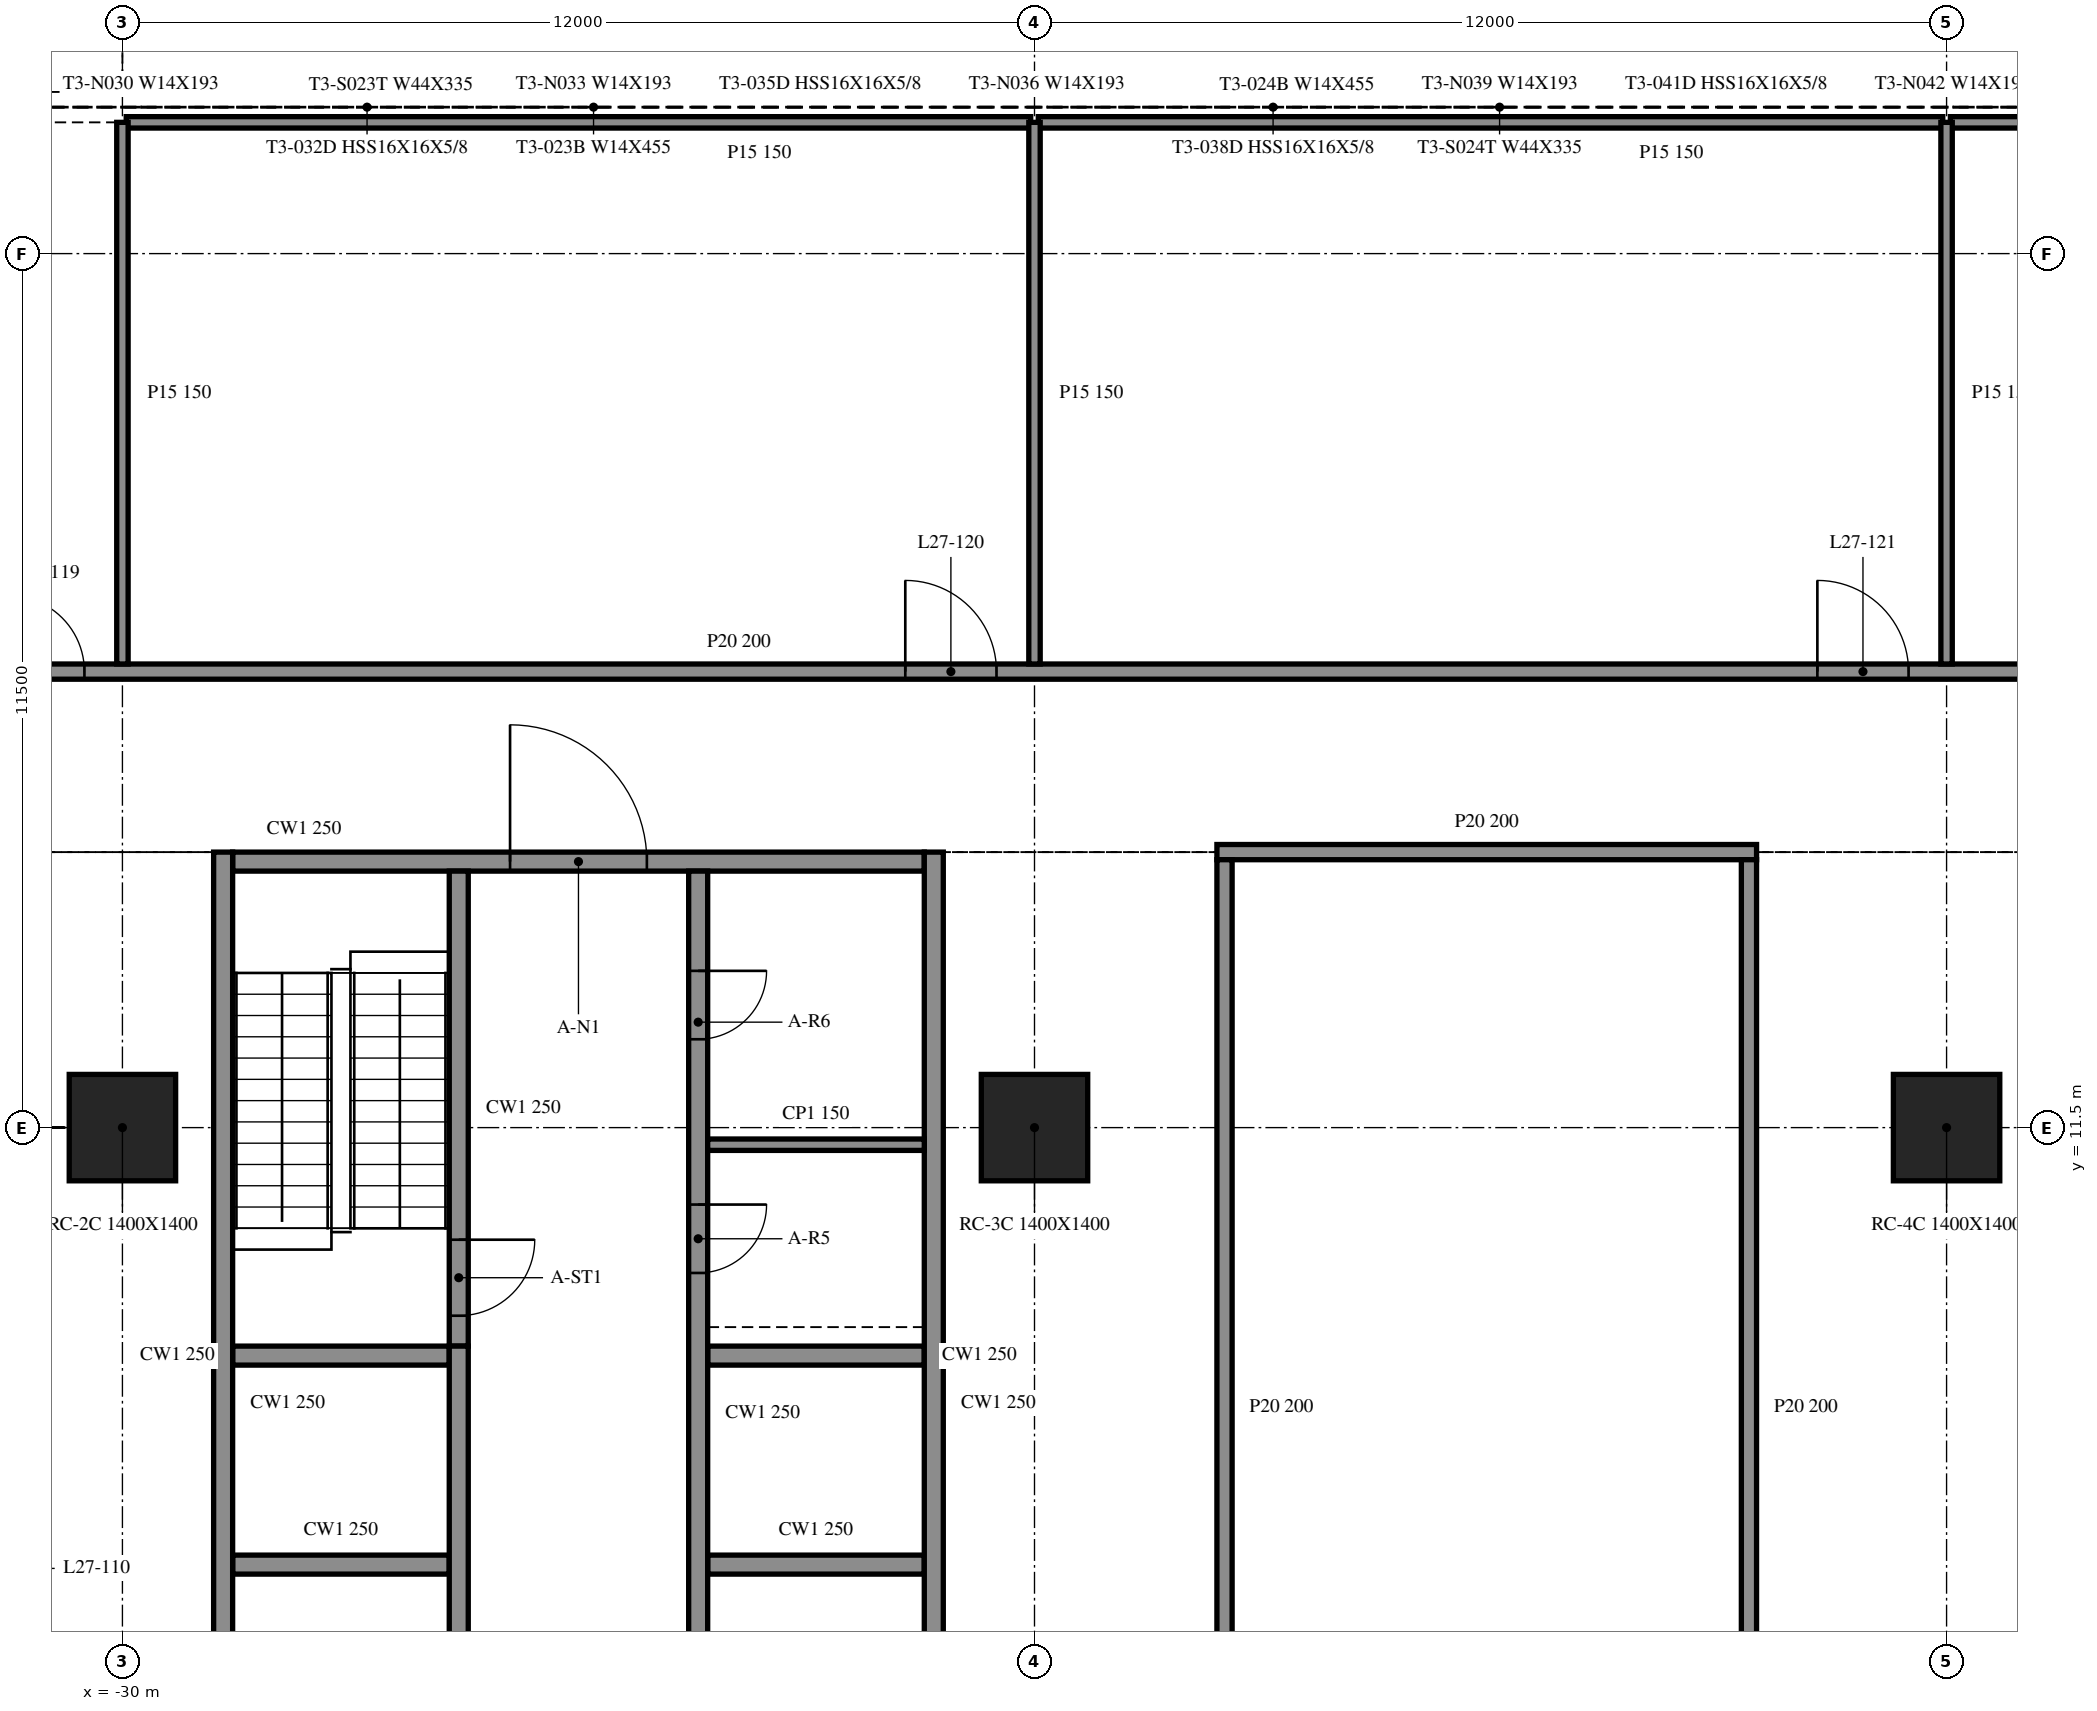
"""IFC4 building model, lengths in metres.
Left out: names, types, materials, properties, quantities, classifications, styles, units other than length and angle.
Written with IfcOpenShell. Run it as: python <this file> out.ifc"""

import sys

from ifc_helpers import new_model, si_unit, direction, frame, frame_2d, origin, origin_2d, place, context, subcontext, project, spatial, rectangle, extrude, element, fill, save


model = new_model("IFC4")
c1 = context("Model", 3, precision=1e-05, world=origin(), true_north=direction((0.0, 1.0)))
c2 = subcontext(c1, "Body", "Model", "MODEL_VIEW")
j1 = project(units=[si_unit("LENGTHUNIT", "METRE"), si_unit("PLANEANGLEUNIT", "RADIAN")], contexts=[c1])
p1 = place(None, origin())
s1 = spatial("IfcSite", under=j1, at=p1, CompositionType="ELEMENT")
p2 = place(p1, origin())
s2 = spatial("IfcBuilding", under=s1, at=p2, CompositionType="ELEMENT")
p3 = place(p2, frame((0.0, 0.0, 117.6)))
s3 = spatial("IfcBuildingStorey", under=s2, at=p3, CompositionType="ELEMENT", Elevation=117.6)
for number, where, z_axis, x_axis in (
    (1, (-30.0, 11.5, -0.55), (0.0, 0.0, 1.0), (1.0, 0.0, 0.0)),
    (2, (-18.0, 11.5, -0.55), (0.0, 0.0, 1.0), (1.0, 0.0, 0.0)),
    (3, (-6.0, 11.5, -0.55), (0.0, 0.0, 1.0), (1.0, 0.0, 0.0)),
):
    element("IfcColumn", number, at=place(p3, frame(where, z_axis=z_axis, x_axis=x_axis)), inside=s3, PredefinedType="COLUMN", context=c2, shape_type="SweptSolid", body=[
        extrude(rectangle(XDim=1.4, YDim=1.4, at=origin_2d()), origin(), (0.0, 0.0, 1.0), 4.61),
    ])
for number, where, z_axis, x_axis in (
    (4, (-28.675, 15.125, 0.0), (0.0, 0.0, 1.0), (0.0, -1.0, 0.0)),
    (5, (-19.325, -9.125, 0.0), (0.0, 0.0, 1.0), (0.0, 1.0, 0.0)),
):
    element("IfcWall", number, at=place(p3, frame(where, z_axis=z_axis, x_axis=x_axis)), inside=s3, PredefinedType="SOLIDWALL", context=c2, shape_type="SweptSolid", body=[
        extrude(rectangle(XDim=24.25, YDim=0.25, at=frame_2d((12.125, 0.0))), origin(), (0.0, 0.0, 1.0), 4.06),
    ])
p4 = place(p3, frame((-28.55, 15.0, 0.0), z_axis=(0.0, 0.0, 1.0), x_axis=(1.0, 0.0, 0.0)))
e6 = element("IfcWall", 6, at=p4, inside=s3, PredefinedType="SOLIDWALL", context=c2, shape_type="SweptSolid", body=[
    extrude(rectangle(XDim=9.1, YDim=0.25, at=frame_2d((4.55, 0.0))), origin(), (0.0, 0.0, 1.0), 4.06),
])
p5 = place(p4, frame((3.65, 0.0, 0.0)))
e7 = element("IfcOpeningElement", 7, at=p5, cuts=e6, PredefinedType="OPENING", context=c2, shape_type="SweptSolid", body=[
    extrude(rectangle(XDim=1.8, YDim=2.1, at=frame_2d((0.9, 1.05))), frame((0.0, 0.135, 0.0), z_axis=(0.0, -1.0, 0.0), x_axis=(1.0, 0.0, 0.0)), (0.0, 0.0, 1.0), 0.27),
])
p6 = place(p3, frame((-25.575, -8.875, 0.0), z_axis=(0.0, 0.0, 1.0), x_axis=(0.0, 1.0, 0.0)))
e8 = element("IfcWall", 8, at=p6, inside=s3, PredefinedType="SOLIDWALL", context=c2, shape_type="SweptSolid", body=[
    extrude(rectangle(XDim=17.5, YDim=0.25, at=frame_2d((8.75, 0.0))), origin(), (0.0, 0.0, 1.0), 4.06),
])
p7 = place(p6, frame((1.012, 0.0, 0.0)))
e9 = element("IfcOpeningElement", 9, at=p7, cuts=e8, PredefinedType="OPENING", context=c2, shape_type="SweptSolid", body=[
    extrude(rectangle(XDim=0.9, YDim=2.1, at=frame_2d((0.45, 1.05))), frame((0.0, 0.135, 0.0), z_axis=(0.0, -1.0, 0.0), x_axis=(1.0, 0.0, 0.0)), (0.0, 0.0, 1.0), 0.27),
])
p8 = place(p6, frame((4.087, 0.0, 0.0)))
e10 = element("IfcOpeningElement", 10, at=p8, cuts=e8, PredefinedType="OPENING", context=c2, shape_type="SweptSolid", body=[
    extrude(rectangle(XDim=0.9, YDim=2.1, at=frame_2d((0.45, 1.05))), frame((0.0, 0.135, 0.0), z_axis=(0.0, -1.0, 0.0), x_axis=(1.0, 0.0, 0.0)), (0.0, 0.0, 1.0), 0.27),
])
p9 = place(p3, frame((-25.575, 14.875, 0.0), z_axis=(0.0, 0.0, 1.0), x_axis=(0.0, -1.0, 0.0)))
e11 = element("IfcWall", 11, at=p9, inside=s3, PredefinedType="SOLIDWALL", context=c2, shape_type="SweptSolid", body=[
    extrude(rectangle(XDim=6.25, YDim=0.25, at=frame_2d((3.125, 0.0))), origin(), (0.0, 0.0, 1.0), 4.06),
])
p10 = place(p9, frame((4.85, 0.0, 0.0)))
e12 = element("IfcOpeningElement", 12, at=p10, cuts=e11, PredefinedType="OPENING", context=c2, shape_type="SweptSolid", body=[
    extrude(rectangle(XDim=1.0, YDim=2.1, at=frame_2d((0.5, 1.05))), frame((0.0, 0.135, 0.0), z_axis=(0.0, -1.0, 0.0), x_axis=(1.0, 0.0, 0.0)), (0.0, 0.0, 1.0), 0.27),
])
p11 = place(p3, frame((-22.425, 14.875, 0.0), z_axis=(0.0, 0.0, 1.0), x_axis=(0.0, -1.0, 0.0)))
e13 = element("IfcWall", 13, at=p11, inside=s3, PredefinedType="SOLIDWALL", context=c2, shape_type="SweptSolid", body=[
    extrude(rectangle(XDim=23.75, YDim=0.25, at=frame_2d((11.875, 0.0))), origin(), (0.0, 0.0, 1.0), 4.06),
])
p12 = place(p11, frame((21.337, 0.0, 0.0)))
e14 = element("IfcOpeningElement", 14, at=p12, cuts=e13, PredefinedType="OPENING", context=c2, shape_type="SweptSolid", body=[
    extrude(rectangle(XDim=0.9, YDim=2.1, at=frame_2d((0.45, 1.05))), frame((0.0, 0.135, 0.0), z_axis=(0.0, -1.0, 0.0), x_axis=(1.0, 0.0, 0.0)), (0.0, 0.0, 1.0), 0.27),
])
p13 = place(p11, frame((18.262, 0.0, 0.0)))
e15 = element("IfcOpeningElement", 15, at=p13, cuts=e13, PredefinedType="OPENING", context=c2, shape_type="SweptSolid", body=[
    extrude(rectangle(XDim=0.9, YDim=2.1, at=frame_2d((0.45, 1.05))), frame((0.0, 0.135, 0.0), z_axis=(0.0, -1.0, 0.0), x_axis=(1.0, 0.0, 0.0)), (0.0, 0.0, 1.0), 0.27),
])
p14 = place(p11, frame((4.387, 0.0, 0.0)))
e16 = element("IfcOpeningElement", 16, at=p14, cuts=e13, PredefinedType="OPENING", context=c2, shape_type="SweptSolid", body=[
    extrude(rectangle(XDim=0.9, YDim=2.1, at=frame_2d((0.45, 1.05))), frame((0.0, 0.135, 0.0), z_axis=(0.0, -1.0, 0.0), x_axis=(1.0, 0.0, 0.0)), (0.0, 0.0, 1.0), 0.27),
])
p15 = place(p11, frame((1.312, 0.0, 0.0)))
e17 = element("IfcOpeningElement", 17, at=p15, cuts=e13, PredefinedType="OPENING", context=c2, shape_type="SweptSolid", body=[
    extrude(rectangle(XDim=0.9, YDim=2.1, at=frame_2d((0.45, 1.05))), frame((0.0, 0.135, 0.0), z_axis=(0.0, -1.0, 0.0), x_axis=(1.0, 0.0, 0.0)), (0.0, 0.0, 1.0), 0.27),
])
for number, where, z_axis, x_axis in (
    (18, (-28.55, 5.75, 0.0), (0.0, 0.0, 1.0), (1.0, 0.0, 0.0)),
    (19, (-28.55, 8.5, 0.0), (0.0, 0.0, 1.0), (1.0, 0.0, 0.0)),
    (20, (-22.3, 5.75, 0.0), (0.0, 0.0, 1.0), (1.0, 0.0, 0.0)),
    (21, (-22.3, 8.5, 0.0), (0.0, 0.0, 1.0), (1.0, 0.0, 0.0)),
):
    element("IfcWall", number, at=place(p3, frame(where, z_axis=z_axis, x_axis=x_axis)), inside=s3, PredefinedType="SOLIDWALL", context=c2, shape_type="SweptSolid", body=[
        extrude(rectangle(XDim=2.85, YDim=0.25, at=frame_2d((1.425, 0.0))), origin(), (0.0, 0.0, 1.0), 4.06),
    ])
p16 = place(p3, frame((-22.3, 11.275, 0.0), z_axis=(0.0, 0.0, 1.0), x_axis=(1.0, 0.0, 0.0)))
e22 = element("IfcWall", 22, at=p16, inside=s3, PredefinedType="PARTITIONING", context=c2, shape_type="SweptSolid", body=[
    extrude(rectangle(XDim=2.85, YDim=0.15, at=frame_2d((1.425, 0.0))), origin(), (0.0, 0.0, 1.0), 4.06),
])
p17 = place(p3, frame((-15.6, 15.125, 0.0), z_axis=(0.0, 0.0, 1.0), x_axis=(1.0, 0.0, 0.0)))
e23 = element("IfcWall", 23, at=p17, inside=s3, PredefinedType="PARTITIONING", context=c2, shape_type="SweptSolid", body=[
    extrude(rectangle(XDim=7.1, YDim=0.2, at=frame_2d((3.55, 0.0))), origin(), (0.0, 0.0, 1.0), 4.06),
])
p18 = place(p3, frame((-48.0, 17.5, 0.0), z_axis=(0.0, 0.0, 1.0), x_axis=(1.0, 0.0, 0.0)))
e24 = element("IfcWall", 24, at=p18, inside=s3, PredefinedType="PARTITIONING", context=c2, shape_type="SweptSolid", body=[
    extrude(rectangle(XDim=95.8, YDim=0.2, at=frame_2d((47.9, 0.0))), origin(), (0.0, 0.0, 1.0), 4.06),
])
p19 = place(p18, frame((4.3, 0.0, 0.0)))
e25 = element("IfcOpeningElement", 25, at=p19, cuts=e24, PredefinedType="OPENING", context=c2, shape_type="SweptSolid", body=[
    extrude(rectangle(XDim=1.2, YDim=2.1, at=frame_2d((0.6, 1.05))), frame((0.0, 0.11, 0.0), z_axis=(0.0, -1.0, 0.0), x_axis=(1.0, 0.0, 0.0)), (0.0, 0.0, 1.0), 0.22),
])
p20 = place(p18, frame((16.5, 0.0, 0.0)))
e26 = element("IfcOpeningElement", 26, at=p20, cuts=e24, PredefinedType="OPENING", context=c2, shape_type="SweptSolid", body=[
    extrude(rectangle(XDim=1.0, YDim=2.1, at=frame_2d((0.5, 1.05))), frame((0.0, 0.11, 0.0), z_axis=(0.0, -1.0, 0.0), x_axis=(1.0, 0.0, 0.0)), (0.0, 0.0, 1.0), 0.22),
])
p21 = place(p18, frame((28.3, 0.0, 0.0)))
e27 = element("IfcOpeningElement", 27, at=p21, cuts=e24, PredefinedType="OPENING", context=c2, shape_type="SweptSolid", body=[
    extrude(rectangle(XDim=1.2, YDim=2.1, at=frame_2d((0.6, 1.05))), frame((0.0, 0.11, 0.0), z_axis=(0.0, -1.0, 0.0), x_axis=(1.0, 0.0, 0.0)), (0.0, 0.0, 1.0), 0.22),
])
p22 = place(p18, frame((40.3, 0.0, 0.0)))
e28 = element("IfcOpeningElement", 28, at=p22, cuts=e24, PredefinedType="OPENING", context=c2, shape_type="SweptSolid", body=[
    extrude(rectangle(XDim=1.2, YDim=2.1, at=frame_2d((0.6, 1.05))), frame((0.0, 0.11, 0.0), z_axis=(0.0, -1.0, 0.0), x_axis=(1.0, 0.0, 0.0)), (0.0, 0.0, 1.0), 0.22),
])
p23 = place(p18, frame((47.3, 0.0, 0.0)))
e29 = element("IfcOpeningElement", 29, at=p23, cuts=e24, PredefinedType="OPENING", context=c2, shape_type="SweptSolid", body=[
    extrude(rectangle(XDim=1.0, YDim=2.1, at=frame_2d((0.5, 1.05))), frame((0.0, 0.11, 0.0), z_axis=(0.0, -1.0, 0.0), x_axis=(1.0, 0.0, 0.0)), (0.0, 0.0, 1.0), 0.22),
])
p24 = place(p18, frame((54.1, 0.0, 0.0)))
e30 = element("IfcOpeningElement", 30, at=p24, cuts=e24, PredefinedType="OPENING", context=c2, shape_type="SweptSolid", body=[
    extrude(rectangle(XDim=1.0, YDim=2.1, at=frame_2d((0.5, 1.05))), frame((0.0, 0.11, 0.0), z_axis=(0.0, -1.0, 0.0), x_axis=(1.0, 0.0, 0.0)), (0.0, 0.0, 1.0), 0.22),
])
p25 = place(p18, frame((66.1, 0.0, 0.0)))
e31 = element("IfcOpeningElement", 31, at=p25, cuts=e24, PredefinedType="OPENING", context=c2, shape_type="SweptSolid", body=[
    extrude(rectangle(XDim=1.2, YDim=2.1, at=frame_2d((0.6, 1.05))), frame((0.0, 0.11, 0.0), z_axis=(0.0, -1.0, 0.0), x_axis=(1.0, 0.0, 0.0)), (0.0, 0.0, 1.0), 0.22),
])
p26 = place(p18, frame((78.1, 0.0, 0.0)))
e32 = element("IfcOpeningElement", 32, at=p26, cuts=e24, PredefinedType="OPENING", context=c2, shape_type="SweptSolid", body=[
    extrude(rectangle(XDim=1.0, YDim=2.1, at=frame_2d((0.5, 1.05))), frame((0.0, 0.11, 0.0), z_axis=(0.0, -1.0, 0.0), x_axis=(1.0, 0.0, 0.0)), (0.0, 0.0, 1.0), 0.22),
])
p27 = place(p18, frame((90.1, 0.0, 0.0)))
e33 = element("IfcOpeningElement", 33, at=p27, cuts=e24, PredefinedType="OPENING", context=c2, shape_type="SweptSolid", body=[
    extrude(rectangle(XDim=1.2, YDim=2.1, at=frame_2d((0.6, 1.05))), frame((0.0, 0.11, 0.0), z_axis=(0.0, -1.0, 0.0), x_axis=(1.0, 0.0, 0.0)), (0.0, 0.0, 1.0), 0.22),
])
for number, where, z_axis, x_axis in (
    (34, (-29.95, 24.727, 0.0), (0.0, 0.0, 1.0), (1.0, 0.0, 0.0)),
    (35, (-17.95, 24.727, 0.0), (0.0, 0.0, 1.0), (1.0, 0.0, 0.0)),
    (36, (-5.95, 24.727, 0.0), (0.0, 0.0, 1.0), (1.0, 0.0, 0.0)),
):
    element("IfcWall", number, at=place(p3, frame(where, z_axis=z_axis, x_axis=x_axis)), inside=s3, PredefinedType="PARTITIONING", context=c2, shape_type="SweptSolid", body=[
        extrude(rectangle(XDim=11.9, YDim=0.15, at=frame_2d((5.95, 0.0))), origin(), (0.0, 0.0, 1.0), 4.06),
    ])
for number, where, z_axis, x_axis in (
    (37, (-30.0, 17.6, 0.0), (0.0, 0.0, 1.0), (0.0, 1.0, 0.0)),
    (38, (-18.0, 17.6, 0.0), (0.0, 0.0, 1.0), (0.0, 1.0, 0.0)),
):
    element("IfcWall", number, at=place(p3, frame(where, z_axis=z_axis, x_axis=x_axis)), inside=s3, PredefinedType="PARTITIONING", context=c2, shape_type="SweptSolid", body=[
        extrude(rectangle(XDim=7.127, YDim=0.15, at=frame_2d((3.563, 0.0))), origin(), (0.0, 0.0, 1.0), 4.06),
    ])
p28 = place(p3, frame((-15.5, -9.025, 0.0), z_axis=(0.0, 0.0, 1.0), x_axis=(0.0, 1.0, 0.0)))
e39 = element("IfcWall", 39, at=p28, inside=s3, PredefinedType="PARTITIONING", context=c2, shape_type="SweptSolid", body=[
    extrude(rectangle(XDim=24.05, YDim=0.2, at=frame_2d((12.025, 0.0))), origin(), (0.0, 0.0, 1.0), 4.06),
])
p29 = place(p28, frame((11.5, 0.0, 0.0)))
e40 = element("IfcOpeningElement", 40, at=p29, cuts=e39, PredefinedType="OPENING", context=c2, shape_type="SweptSolid", body=[
    extrude(rectangle(XDim=1.0, YDim=2.1, at=frame_2d((0.5, 1.05))), frame((0.0, 0.11, 0.0), z_axis=(0.0, -1.0, 0.0), x_axis=(1.0, 0.0, 0.0)), (0.0, 0.0, 1.0), 0.22),
])
p30 = place(p3, frame((-8.6, -9.025, 0.0), z_axis=(0.0, 0.0, 1.0), x_axis=(0.0, 1.0, 0.0)))
e41 = element("IfcWall", 41, at=p30, inside=s3, PredefinedType="PARTITIONING", context=c2, shape_type="SweptSolid", body=[
    extrude(rectangle(XDim=24.05, YDim=0.2, at=frame_2d((12.025, 0.0))), origin(), (0.0, 0.0, 1.0), 4.06),
])
p31 = place(p3, frame((-6.0, 17.6, 0.0), z_axis=(0.0, 0.0, 1.0), x_axis=(0.0, 1.0, 0.0)))
e42 = element("IfcWall", 42, at=p31, inside=s3, PredefinedType="PARTITIONING", context=c2, shape_type="SweptSolid", body=[
    extrude(rectangle(XDim=7.127, YDim=0.15, at=frame_2d((3.563, 0.0))), origin(), (0.0, 0.0, 1.0), 4.06),
])
p32 = place(p5, origin())
e43 = element("IfcDoor", 43, at=p32, inside=s3, OperationType="DOUBLE_DOOR_SINGLE_SWING", PredefinedType="DOOR", context=c2, shape_type="SweptSolid", body=[
    extrude(rectangle(XDim=1.8, YDim=2.1, at=frame_2d((0.9, 1.05))), frame((0.0, 0.025, 0.0), z_axis=(0.0, -1.0, 0.0), x_axis=(1.0, 0.0, 0.0)), (0.0, 0.0, 1.0), 0.05),
])
fill(e7, e43)
p33 = place(p14, origin())
e44 = element("IfcDoor", 44, at=p33, inside=s3, OperationType="SINGLE_SWING_LEFT", PredefinedType="DOOR", context=c2, shape_type="SweptSolid", body=[
    extrude(rectangle(XDim=0.9, YDim=2.1, at=frame_2d((0.45, 1.05))), frame((0.0, 0.025, 0.0), z_axis=(0.0, -1.0, 0.0), x_axis=(1.0, 0.0, 0.0)), (0.0, 0.0, 1.0), 0.05),
])
fill(e16, e44)
p34 = place(p15, origin())
e45 = element("IfcDoor", 45, at=p34, inside=s3, OperationType="SINGLE_SWING_RIGHT", PredefinedType="DOOR", context=c2, shape_type="SweptSolid", body=[
    extrude(rectangle(XDim=0.9, YDim=2.1, at=frame_2d((0.45, 1.05))), frame((0.0, 0.025, 0.0), z_axis=(0.0, -1.0, 0.0), x_axis=(1.0, 0.0, 0.0)), (0.0, 0.0, 1.0), 0.05),
])
fill(e17, e45)
p35 = place(p10, origin())
e46 = element("IfcDoor", 46, at=p35, inside=s3, OperationType="SINGLE_SWING_LEFT", PredefinedType="DOOR", context=c2, shape_type="SweptSolid", body=[
    extrude(rectangle(XDim=1.0, YDim=2.1, at=frame_2d((0.5, 1.05))), frame((0.0, 0.025, 0.0), z_axis=(0.0, -1.0, 0.0), x_axis=(1.0, 0.0, 0.0)), (0.0, 0.0, 1.0), 0.05),
])
fill(e12, e46)
p36 = place(p20, origin())
e47 = element("IfcDoor", 47, at=p36, inside=s3, OperationType="SINGLE_SWING_LEFT", PredefinedType="DOOR", context=c2, shape_type="SweptSolid", body=[
    extrude(rectangle(XDim=1.0, YDim=2.1, at=frame_2d((0.5, 1.05))), frame((0.0, 0.025, 0.0), z_axis=(0.0, -1.0, 0.0), x_axis=(1.0, 0.0, 0.0)), (0.0, 0.0, 1.0), 0.05),
])
fill(e26, e47)
p37 = place(p21, origin())
e48 = element("IfcDoor", 48, at=p37, inside=s3, OperationType="SINGLE_SWING_LEFT", PredefinedType="DOOR", context=c2, shape_type="SweptSolid", body=[
    extrude(rectangle(XDim=1.2, YDim=2.1, at=frame_2d((0.6, 1.05))), frame((0.0, 0.025, 0.0), z_axis=(0.0, -1.0, 0.0), x_axis=(1.0, 0.0, 0.0)), (0.0, 0.0, 1.0), 0.05),
])
fill(e27, e48)
p38 = place(p22, origin())
e49 = element("IfcDoor", 49, at=p38, inside=s3, OperationType="SINGLE_SWING_LEFT", PredefinedType="DOOR", context=c2, shape_type="SweptSolid", body=[
    extrude(rectangle(XDim=1.2, YDim=2.1, at=frame_2d((0.6, 1.05))), frame((0.0, 0.025, 0.0), z_axis=(0.0, -1.0, 0.0), x_axis=(1.0, 0.0, 0.0)), (0.0, 0.0, 1.0), 0.05),
])
fill(e28, e49)
save(model, sys.argv[1])
